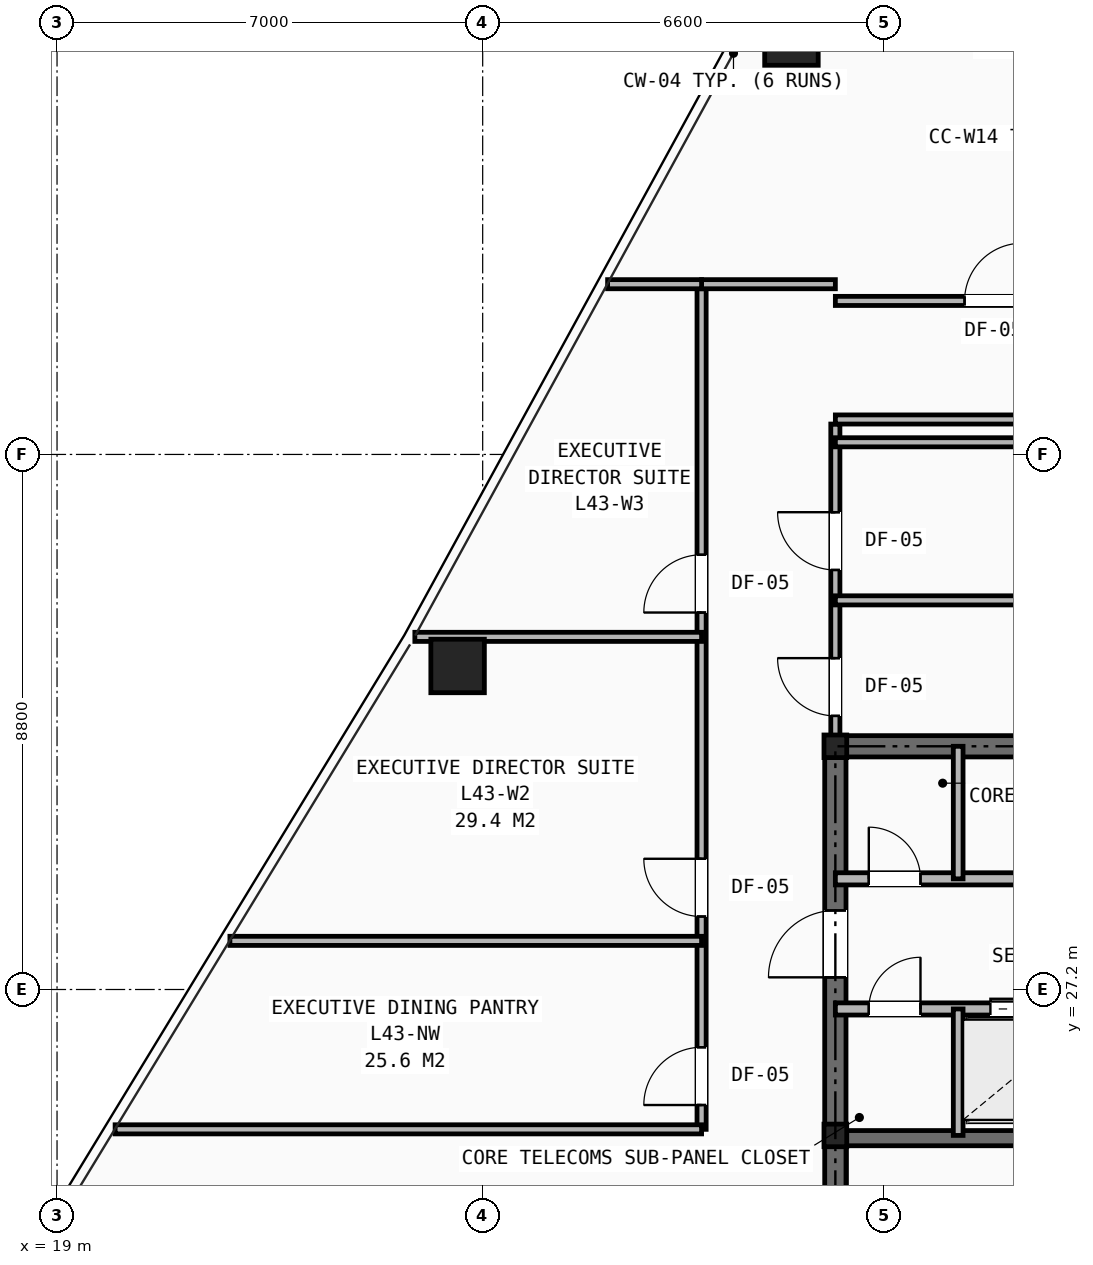
"""IFC4 building model, lengths in metres.
Left out: names, types, materials, properties, quantities, classifications, styles, units other than length and angle.
Written with IfcOpenShell. Run it as: python <this file> out.ifc"""

import sys

from ifc_helpers import new_model, si_unit, direction, frame, frame_2d, origin, origin_2d, place, context, subcontext, project, spatial, rectangle, hollow_rectangle, i_section, extrude, element, fill, save


model = new_model("IFC4")
c1 = context("Model", 3, precision=1e-05, world=origin(), true_north=direction((0.0, 1.0)))
c2 = subcontext(c1, "Body", "Model", "MODEL_VIEW")
j1 = project(units=[si_unit("LENGTHUNIT", "METRE"), si_unit("PLANEANGLEUNIT", "RADIAN")], contexts=[c1])
p1 = place(None, origin())
s1 = spatial("IfcSite", under=j1, at=p1, CompositionType="ELEMENT")
p2 = place(p1, origin())
s2 = spatial("IfcBuilding", under=s1, at=p2, CompositionType="ELEMENT")
p3 = place(p2, frame((0.0, 0.0, 150.5)))
s3 = spatial("IfcBuildingStorey", under=s2, at=p3, CompositionType="ELEMENT", Elevation=150.5)
for number, where, z_axis, x_axis in (
    (1, (31.8, 24.8, 0.0), (0.0, 0.0, 1.0), (1.0, 0.0, 0.0)),
    (2, (31.8, 31.2, 0.0), (0.0, 0.0, 1.0), (1.0, 0.0, 0.0)),
):
    element("IfcColumn", number, at=place(p3, frame(where, z_axis=z_axis, x_axis=x_axis)), inside=s3, PredefinedType="COLUMN", context=c2, shape_type="SweptSolid", body=[
        extrude(i_section(OverallWidth=0.374, OverallDepth=0.372, WebThickness=0.016, FlangeThickness=0.026, at=origin_2d()), origin(), (0.0, 0.0, 1.0), 3.45),
    ])
for number, where, z_axis, x_axis in (
    (3, (31.078, 42.841, 0.0), (0.0, 0.0, 1.0), (1.0, 0.0, 0.0)),
    (4, (25.588, 32.521, 0.0), (0.0, 0.0, 1.0), (1.0, 0.0, 0.0)),
):
    element("IfcColumn", number, at=place(p3, frame(where, z_axis=z_axis, x_axis=x_axis)), inside=s3, PredefinedType="COLUMN", context=c2, shape_type="SweptSolid", body=[
        extrude(hollow_rectangle(XDim=0.88, YDim=0.88, WallThickness=0.06, at=origin_2d()), origin(), (0.0, 0.0, 1.0), 3.45),
    ])
p4 = place(p3, frame((31.8, 31.2, 0.0), z_axis=(0.0, 0.0, 1.0), x_axis=(1.0, 0.0, 0.0)))
e5 = element("IfcWall", 5, at=p4, inside=s3, PredefinedType="SHEAR", context=c2, shape_type="SweptSolid", body=[
    extrude(rectangle(XDim=16.4, YDim=0.35, at=frame_2d((8.2, 0.0))), origin(), (0.0, 0.0, 1.0), 3.21),
])
p5 = place(p3, frame((31.8, 16.4, 0.0), z_axis=(0.0, 0.0, 1.0), x_axis=(0.0, 1.0, 0.0)))
e6 = element("IfcWall", 6, at=p5, inside=s3, PredefinedType="SHEAR", context=c2, shape_type="SweptSolid", body=[
    extrude(rectangle(XDim=14.8, YDim=0.35, at=frame_2d((7.4, 0.0))), origin(), (0.0, 0.0, 1.0), 3.21),
])
p6 = place(p5, frame((11.0, 0.0, 0.0)))
e7 = element("IfcOpeningElement", 7, at=p6, cuts=e6, PredefinedType="OPENING", context=c2, shape_type="SweptSolid", body=[
    extrude(rectangle(XDim=1.1, YDim=2.15, at=frame_2d((0.55, 1.075))), frame((0.0, 0.185, 0.0), z_axis=(0.0, -1.0, 0.0), x_axis=(1.0, 0.0, 0.0)), (0.0, 0.0, 1.0), 0.37),
])
p7 = place(p3, frame((31.8, 24.755, 0.0), z_axis=(0.0, 0.0, 1.0), x_axis=(1.0, 0.0, 0.0)))
e8 = element("IfcWall", 8, at=p7, inside=s3, PredefinedType="SHEAR", context=c2, shape_type="SweptSolid", body=[
    extrude(rectangle(XDim=3.245, YDim=0.25, at=frame_2d((1.623, 0.0))), origin(), (0.0, 0.0, 1.0), 3.21),
])
p8 = place(p3, frame((31.8, 29.02, 0.0), z_axis=(0.0, 0.0, 1.0), x_axis=(1.0, 0.0, 0.0)))
e9 = element("IfcWall", 9, at=p8, inside=s3, PredefinedType="SOLIDWALL", context=c2, shape_type="SweptSolid", body=[
    extrude(rectangle(XDim=16.4, YDim=0.2, at=frame_2d((8.2, 0.0))), origin(), (0.0, 0.0, 1.0), 2.661),
])
p9 = place(p8, frame((0.55, 0.0, 0.0)))
e10 = element("IfcOpeningElement", 10, at=p9, cuts=e9, PredefinedType="OPENING", context=c2, shape_type="SweptSolid", body=[
    extrude(rectangle(XDim=0.85, YDim=2.05, at=frame_2d((0.425, 1.025))), frame((0.0, 0.11, 0.0), z_axis=(0.0, -1.0, 0.0), x_axis=(1.0, 0.0, 0.0)), (0.0, 0.0, 1.0), 0.22),
])
p10 = place(p8, frame((5.94, 0.0, 0.0)))
e11 = element("IfcOpeningElement", 11, at=p10, cuts=e9, PredefinedType="OPENING", context=c2, shape_type="SweptSolid", body=[
    extrude(rectangle(XDim=0.9, YDim=2.1, at=frame_2d((0.45, 1.05))), frame((0.0, 0.11, 0.0), z_axis=(0.0, -1.0, 0.0), x_axis=(1.0, 0.0, 0.0)), (0.0, 0.0, 1.0), 0.22),
])
p11 = place(p3, frame((31.8, 26.88, 0.0), z_axis=(0.0, 0.0, 1.0), x_axis=(1.0, 0.0, 0.0)))
e12 = element("IfcWall", 12, at=p11, inside=s3, PredefinedType="SOLIDWALL", context=c2, shape_type="SweptSolid", body=[
    extrude(rectangle(XDim=16.4, YDim=0.2, at=frame_2d((8.2, 0.0))), origin(), (0.0, 0.0, 1.0), 2.661),
])
p12 = place(p11, frame((0.55, 0.0, 0.0)))
e13 = element("IfcOpeningElement", 13, at=p12, cuts=e12, PredefinedType="OPENING", context=c2, shape_type="SweptSolid", body=[
    extrude(rectangle(XDim=0.85, YDim=2.05, at=frame_2d((0.425, 1.025))), frame((0.0, 0.11, 0.0), z_axis=(0.0, -1.0, 0.0), x_axis=(1.0, 0.0, 0.0)), (0.0, 0.0, 1.0), 0.22),
])
p13 = place(p11, frame((2.55, 0.0, 0.0)))
e14 = element("IfcOpeningElement", 14, at=p13, cuts=e12, PredefinedType="OPENING", context=c2, shape_type="SweptSolid", body=[
    extrude(rectangle(XDim=1.1, YDim=2.15, at=frame_2d((0.55, 1.075))), frame((0.0, 0.11, 0.0), z_axis=(0.0, -1.0, 0.0), x_axis=(1.0, 0.0, 0.0)), (0.0, 0.0, 1.0), 0.22),
])
p14 = place(p11, frame((4.71, 0.0, 0.0)))
e15 = element("IfcOpeningElement", 15, at=p14, cuts=e12, PredefinedType="OPENING", context=c2, shape_type="SweptSolid", body=[
    extrude(rectangle(XDim=1.1, YDim=2.15, at=frame_2d((0.55, 1.075))), frame((0.0, 0.11, 0.0), z_axis=(0.0, -1.0, 0.0), x_axis=(1.0, 0.0, 0.0)), (0.0, 0.0, 1.0), 0.22),
])
p15 = place(p11, frame((6.87, 0.0, 0.0)))
e16 = element("IfcOpeningElement", 16, at=p15, cuts=e12, PredefinedType="OPENING", context=c2, shape_type="SweptSolid", body=[
    extrude(rectangle(XDim=1.1, YDim=2.15, at=frame_2d((0.55, 1.075))), frame((0.0, 0.11, 0.0), z_axis=(0.0, -1.0, 0.0), x_axis=(1.0, 0.0, 0.0)), (0.0, 0.0, 1.0), 0.22),
])
p16 = place(p11, frame((9.03, 0.0, 0.0)))
e17 = element("IfcOpeningElement", 17, at=p16, cuts=e12, PredefinedType="OPENING", context=c2, shape_type="SweptSolid", body=[
    extrude(rectangle(XDim=1.1, YDim=2.15, at=frame_2d((0.55, 1.075))), frame((0.0, 0.11, 0.0), z_axis=(0.0, -1.0, 0.0), x_axis=(1.0, 0.0, 0.0)), (0.0, 0.0, 1.0), 0.22),
])
p17 = place(p3, frame((33.82, 29.02, 0.0), z_axis=(0.0, 0.0, 1.0), x_axis=(0.0, 1.0, 0.0)))
e18 = element("IfcWall", 18, at=p17, inside=s3, PredefinedType="SOLIDWALL", context=c2, shape_type="SweptSolid", body=[
    extrude(rectangle(XDim=2.18, YDim=0.16, at=frame_2d((1.09, 0.0))), origin(), (0.0, 0.0, 1.0), 2.661),
])
p18 = place(p3, frame((33.82, 24.8, 0.0), z_axis=(0.0, 0.0, 1.0), x_axis=(0.0, 1.0, 0.0)))
e19 = element("IfcWall", 19, at=p18, inside=s3, PredefinedType="SOLIDWALL", context=c2, shape_type="SweptSolid", body=[
    extrude(rectangle(XDim=2.08, YDim=0.16, at=frame_2d((1.04, 0.0))), origin(), (0.0, 0.0, 1.0), 3.21),
])
p19 = place(p3, frame((29.6, 24.9, 0.0), z_axis=(0.0, 0.0, 1.0), x_axis=(0.0, 1.0, 0.0)))
e20 = element("IfcWall", 20, at=p19, inside=s3, PredefinedType="PARTITIONING", context=c2, shape_type="SweptSolid", body=[
    extrude(rectangle(XDim=13.9, YDim=0.15, at=frame_2d((6.95, 0.0))), origin(), (0.0, 0.0, 1.0), 2.252),
])
p20 = place(p19, frame((0.4, 0.0, 0.0)))
e21 = element("IfcOpeningElement", 21, at=p20, cuts=e20, PredefinedType="OPENING", context=c2, shape_type="SweptSolid", body=[
    extrude(rectangle(XDim=0.95, YDim=2.1, at=frame_2d((0.475, 1.05))), frame((0.0, 0.085, 0.0), z_axis=(0.0, -1.0, 0.0), x_axis=(1.0, 0.0, 0.0)), (0.0, 0.0, 1.0), 0.17),
])
p21 = place(p19, frame((3.5, 0.0, 0.0)))
e22 = element("IfcOpeningElement", 22, at=p21, cuts=e20, PredefinedType="OPENING", context=c2, shape_type="SweptSolid", body=[
    extrude(rectangle(XDim=0.95, YDim=2.1, at=frame_2d((0.475, 1.05))), frame((0.0, 0.085, 0.0), z_axis=(0.0, -1.0, 0.0), x_axis=(1.0, 0.0, 0.0)), (0.0, 0.0, 1.0), 0.17),
])
p22 = place(p19, frame((8.5, 0.0, 0.0)))
e23 = element("IfcOpeningElement", 23, at=p22, cuts=e20, PredefinedType="OPENING", context=c2, shape_type="SweptSolid", body=[
    extrude(rectangle(XDim=0.95, YDim=2.1, at=frame_2d((0.475, 1.05))), frame((0.0, 0.085, 0.0), z_axis=(0.0, -1.0, 0.0), x_axis=(1.0, 0.0, 0.0)), (0.0, 0.0, 1.0), 0.17),
])
p23 = place(p3, frame((31.8, 31.2, 0.0), z_axis=(0.0, 0.0, 1.0), x_axis=(0.0, 1.0, 0.0)))
e24 = element("IfcWall", 24, at=p23, inside=s3, PredefinedType="PARTITIONING", context=c2, shape_type="SweptSolid", body=[
    extrude(rectangle(XDim=5.3, YDim=0.15, at=frame_2d((2.65, 0.0))), origin(), (0.0, 0.0, 1.0), 2.252),
])
p24 = place(p23, frame((0.5, 0.0, 0.0)))
e25 = element("IfcOpeningElement", 25, at=p24, cuts=e24, PredefinedType="OPENING", context=c2, shape_type="SweptSolid", body=[
    extrude(rectangle(XDim=0.95, YDim=2.1, at=frame_2d((0.475, 1.05))), frame((0.0, 0.085, 0.0), z_axis=(0.0, -1.0, 0.0), x_axis=(1.0, 0.0, 0.0)), (0.0, 0.0, 1.0), 0.17),
])
p25 = place(p23, frame((2.9, 0.0, 0.0)))
e26 = element("IfcOpeningElement", 26, at=p25, cuts=e24, PredefinedType="OPENING", context=c2, shape_type="SweptSolid", body=[
    extrude(rectangle(XDim=0.95, YDim=2.1, at=frame_2d((0.475, 1.05))), frame((0.0, 0.085, 0.0), z_axis=(0.0, -1.0, 0.0), x_axis=(1.0, 0.0, 0.0)), (0.0, 0.0, 1.0), 0.17),
])
p26 = place(p3, frame((29.6, 38.8, 0.0), z_axis=(0.0, 0.0, 1.0), x_axis=(1.0, 0.0, 0.0)))
e27 = element("IfcWall", 27, at=p26, inside=s3, PredefinedType="PARTITIONING", context=c2, shape_type="SweptSolid", body=[
    extrude(rectangle(XDim=2.2, YDim=0.15, at=frame_2d((1.1, 0.0))), origin(), (0.0, 0.0, 1.0), 2.743),
])
p27 = place(p3, frame((19.955, 24.9, 0.0), z_axis=(0.0, 0.0, 1.0), x_axis=(1.0, 0.0, 0.0)))
e28 = element("IfcWall", 28, at=p27, inside=s3, PredefinedType="PARTITIONING", context=c2, shape_type="SweptSolid", body=[
    extrude(rectangle(XDim=9.645, YDim=0.15, at=frame_2d((4.823, 0.0))), origin(), (0.0, 0.0, 1.0), 2.589),
])
p28 = place(p3, frame((28.054, 38.8, 0.0), z_axis=(0.0, 0.0, 1.0), x_axis=(1.0, 0.0, 0.0)))
e29 = element("IfcWall", 29, at=p28, inside=s3, PredefinedType="PARTITIONING", context=c2, shape_type="SweptSolid", body=[
    extrude(rectangle(XDim=1.546, YDim=0.15, at=frame_2d((0.773, 0.0))), origin(), (0.0, 0.0, 1.0), 2.589),
])
p29 = place(p3, frame((21.843, 28.0, 0.0), z_axis=(0.0, 0.0, 1.0), x_axis=(1.0, 0.0, 0.0)))
e30 = element("IfcWall", 30, at=p29, inside=s3, PredefinedType="PARTITIONING", context=c2, shape_type="SweptSolid", body=[
    extrude(rectangle(XDim=7.757, YDim=0.15, at=frame_2d((3.878, 0.0))), origin(), (0.0, 0.0, 1.0), 2.589),
])
p30 = place(p3, frame((24.885, 33.0, 0.0), z_axis=(0.0, 0.0, 1.0), x_axis=(1.0, 0.0, 0.0)))
e31 = element("IfcWall", 31, at=p30, inside=s3, PredefinedType="PARTITIONING", context=c2, shape_type="SweptSolid", body=[
    extrude(rectangle(XDim=4.716, YDim=0.15, at=frame_2d((2.358, 0.0))), origin(), (0.0, 0.0, 1.0), 2.589),
])
p31 = place(p3, frame((31.8, 33.6, 0.0), z_axis=(0.0, 0.0, 1.0), x_axis=(1.0, 0.0, 0.0)))
e32 = element("IfcWall", 32, at=p31, inside=s3, PredefinedType="PARTITIONING", context=c2, shape_type="SweptSolid", body=[
    extrude(rectangle(XDim=22.988, YDim=0.15, at=frame_2d((11.494, 0.0))), origin(), (0.0, 0.0, 1.0), 2.589),
])
p32 = place(p3, frame((31.8, 36.2, 0.0), z_axis=(0.0, 0.0, 1.0), x_axis=(1.0, 0.0, 0.0)))
e33 = element("IfcWall", 33, at=p32, inside=s3, PredefinedType="PARTITIONING", context=c2, shape_type="SweptSolid", body=[
    extrude(rectangle(XDim=21.567, YDim=0.15, at=frame_2d((10.783, 0.0))), origin(), (0.0, 0.0, 1.0), 2.589),
])
p33 = place(p3, frame((31.8, 36.575, 0.0), z_axis=(0.0, 0.0, 1.0), x_axis=(1.0, 0.0, 0.0)))
e34 = element("IfcWall", 34, at=p33, inside=s3, PredefinedType="PARTITIONING", context=c2, shape_type="SweptSolid", body=[
    extrude(rectangle(XDim=9.15, YDim=0.15, at=frame_2d((4.575, 0.0))), origin(), (0.0, 0.0, 1.0), 3.21),
])
p34 = place(p3, frame((31.8, 38.525, 0.0), z_axis=(0.0, 0.0, 1.0), x_axis=(1.0, 0.0, 0.0)))
e35 = element("IfcWall", 35, at=p34, inside=s3, PredefinedType="PARTITIONING", context=c2, shape_type="SweptSolid", body=[
    extrude(rectangle(XDim=6.25, YDim=0.15, at=frame_2d((3.125, 0.0))), origin(), (0.0, 0.0, 1.0), 2.743),
])
p35 = place(p34, frame((2.125, 0.0, 0.0)))
e36 = element("IfcOpeningElement", 36, at=p35, cuts=e35, PredefinedType="OPENING", context=c2, shape_type="SweptSolid", body=[
    extrude(rectangle(XDim=0.95, YDim=2.1, at=frame_2d((0.475, 1.05))), frame((0.0, 0.085, 0.0), z_axis=(0.0, -1.0, 0.0), x_axis=(1.0, 0.0, 0.0)), (0.0, 0.0, 1.0), 0.17),
])
p36 = place(p9, origin())
e37 = element("IfcDoor", 37, at=p36, inside=s3, OperationType="SINGLE_SWING_LEFT", PredefinedType="DOOR", context=c2, shape_type="SweptSolid", body=[
    extrude(rectangle(XDim=0.85, YDim=2.05, at=frame_2d((0.425, 1.025))), frame((0.0, 0.025, 0.0), z_axis=(0.0, -1.0, 0.0), x_axis=(1.0, 0.0, 0.0)), (0.0, 0.0, 1.0), 0.05),
])
fill(e10, e37)
p37 = place(p12, origin())
e38 = element("IfcDoor", 38, at=p37, inside=s3, OperationType="SINGLE_SWING_RIGHT", PredefinedType="DOOR", context=c2, shape_type="SweptSolid", body=[
    extrude(rectangle(XDim=0.85, YDim=2.05, at=frame_2d((0.425, 1.025))), frame((0.0, 0.025, 0.0), z_axis=(0.0, -1.0, 0.0), x_axis=(1.0, 0.0, 0.0)), (0.0, 0.0, 1.0), 0.05),
])
fill(e13, e38)
p38 = place(p6, origin())
e39 = element("IfcDoor", 39, at=p38, inside=s3, OperationType="SINGLE_SWING_LEFT", PredefinedType="DOOR", context=c2, shape_type="SweptSolid", body=[
    extrude(rectangle(XDim=1.1, YDim=2.15, at=frame_2d((0.55, 1.075))), frame((0.0, 0.025, 0.0), z_axis=(0.0, -1.0, 0.0), x_axis=(1.0, 0.0, 0.0)), (0.0, 0.0, 1.0), 0.05),
])
fill(e7, e39)
p39 = place(p13, origin())
e40 = element("IfcDoor", 40, at=p39, inside=s3, OperationType="DOUBLE_DOOR_SLIDING", PredefinedType="DOOR", context=c2, shape_type="SweptSolid", body=[
    extrude(rectangle(XDim=1.1, YDim=2.15, at=frame_2d((0.55, 1.075))), frame((0.0, 0.025, 0.0), z_axis=(0.0, -1.0, 0.0), x_axis=(1.0, 0.0, 0.0)), (0.0, 0.0, 1.0), 0.05),
])
fill(e14, e40)
p40 = place(p20, origin())
e41 = element("IfcDoor", 41, at=p40, inside=s3, OperationType="SINGLE_SWING_LEFT", PredefinedType="DOOR", context=c2, shape_type="SweptSolid", body=[
    extrude(rectangle(XDim=0.95, YDim=2.1, at=frame_2d((0.475, 1.05))), frame((0.0, 0.025, 0.0), z_axis=(0.0, -1.0, 0.0), x_axis=(1.0, 0.0, 0.0)), (0.0, 0.0, 1.0), 0.05),
])
fill(e21, e41)
p41 = place(p21, origin())
e42 = element("IfcDoor", 42, at=p41, inside=s3, OperationType="SINGLE_SWING_RIGHT", PredefinedType="DOOR", context=c2, shape_type="SweptSolid", body=[
    extrude(rectangle(XDim=0.95, YDim=2.1, at=frame_2d((0.475, 1.05))), frame((0.0, 0.025, 0.0), z_axis=(0.0, -1.0, 0.0), x_axis=(1.0, 0.0, 0.0)), (0.0, 0.0, 1.0), 0.05),
])
fill(e22, e42)
p42 = place(p22, origin())
e43 = element("IfcDoor", 43, at=p42, inside=s3, OperationType="SINGLE_SWING_LEFT", PredefinedType="DOOR", context=c2, shape_type="SweptSolid", body=[
    extrude(rectangle(XDim=0.95, YDim=2.1, at=frame_2d((0.475, 1.05))), frame((0.0, 0.025, 0.0), z_axis=(0.0, -1.0, 0.0), x_axis=(1.0, 0.0, 0.0)), (0.0, 0.0, 1.0), 0.05),
])
fill(e23, e43)
p43 = place(p24, origin())
e44 = element("IfcDoor", 44, at=p43, inside=s3, OperationType="SINGLE_SWING_RIGHT", PredefinedType="DOOR", context=c2, shape_type="SweptSolid", body=[
    extrude(rectangle(XDim=0.95, YDim=2.1, at=frame_2d((0.475, 1.05))), frame((0.0, 0.025, 0.0), z_axis=(0.0, -1.0, 0.0), x_axis=(1.0, 0.0, 0.0)), (0.0, 0.0, 1.0), 0.05),
])
fill(e25, e44)
p44 = place(p25, origin())
e45 = element("IfcDoor", 45, at=p44, inside=s3, OperationType="SINGLE_SWING_RIGHT", PredefinedType="DOOR", context=c2, shape_type="SweptSolid", body=[
    extrude(rectangle(XDim=0.95, YDim=2.1, at=frame_2d((0.475, 1.05))), frame((0.0, 0.025, 0.0), z_axis=(0.0, -1.0, 0.0), x_axis=(1.0, 0.0, 0.0)), (0.0, 0.0, 1.0), 0.05),
])
fill(e26, e45)
p45 = place(p35, origin())
e46 = element("IfcDoor", 46, at=p45, inside=s3, OperationType="SINGLE_SWING_RIGHT", PredefinedType="DOOR", context=c2, shape_type="SweptSolid", body=[
    extrude(rectangle(XDim=0.95, YDim=2.1, at=frame_2d((0.475, 1.05))), frame((0.0, 0.025, 0.0), z_axis=(0.0, -1.0, 0.0), x_axis=(1.0, 0.0, 0.0)), (0.0, 0.0, 1.0), 0.05),
])
fill(e36, e46)
save(model, sys.argv[1])
